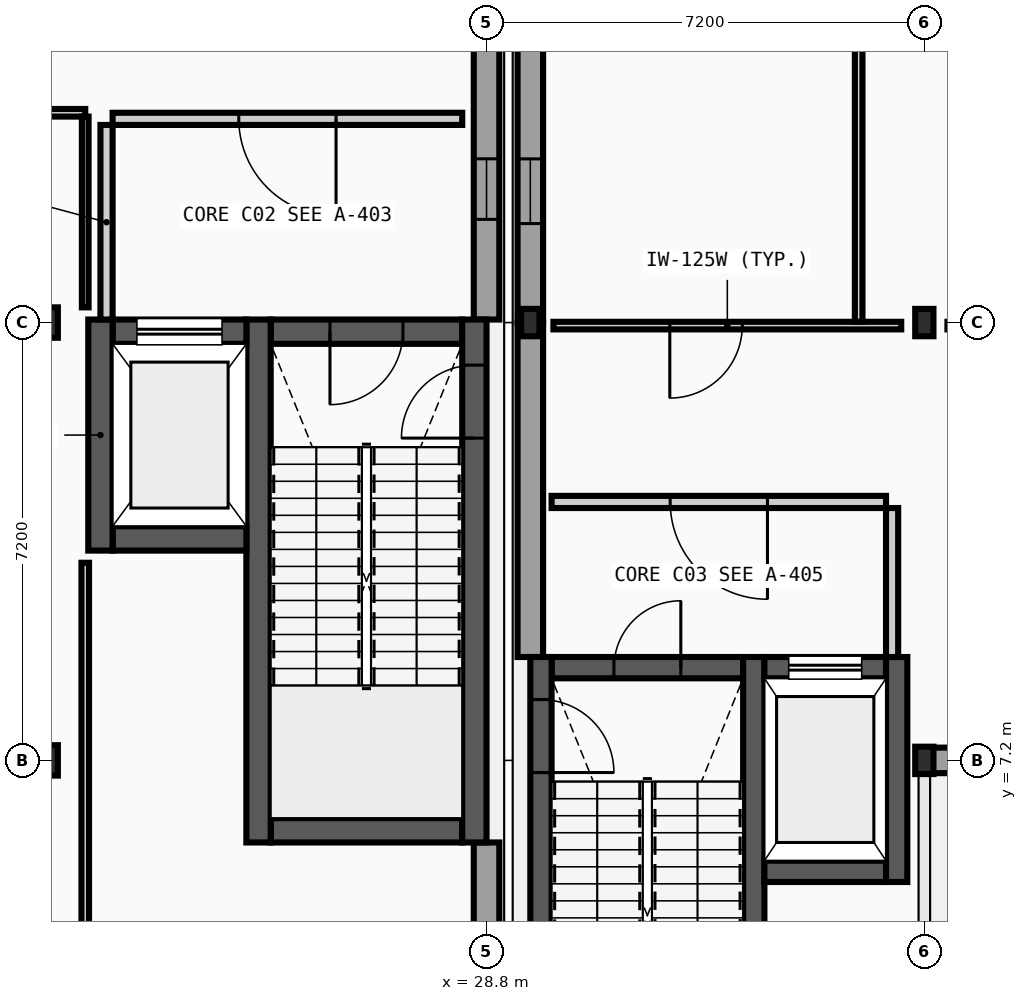
"""IFC4 building model, lengths in metres.
Left out: names, types, materials, properties, quantities, classifications, styles, units other than length and angle.
Written with IfcOpenShell. Run it as: python <this file> out.ifc"""

import sys

from ifc_helpers import new_model, si_unit, direction, frame, frame_2d, origin, origin_2d, place, context, subcontext, project, spatial, rectangle, i_section, extrude, element, fill, save


model = new_model("IFC4")
c1 = context("Model", 3, precision=1e-05, world=origin(), true_north=direction((0.0, 1.0)))
c2 = subcontext(c1, "Body", "Model", "MODEL_VIEW")
j1 = project(units=[si_unit("LENGTHUNIT", "METRE"), si_unit("PLANEANGLEUNIT", "RADIAN")], contexts=[c1])
p1 = place(None, origin())
s1 = spatial("IfcSite", under=j1, at=p1, CompositionType="ELEMENT")
p2 = place(p1, origin())
s2 = spatial("IfcBuilding", under=s1, at=p2, CompositionType="ELEMENT")
p3 = place(p2, origin())
s3 = spatial("IfcBuildingStorey", under=s2, at=p3, CompositionType="ELEMENT", Elevation=0.0)
for number, where, z_axis, x_axis in (
    (1, (21.6, 7.2, 0.0), (0.0, 0.0, 1.0), (1.0, 0.0, 0.0)),
    (2, (21.6, 14.4, 0.0), (0.0, 0.0, 1.0), (1.0, 0.0, 0.0)),
):
    element("IfcColumn", number, at=place(p3, frame(where, z_axis=z_axis, x_axis=x_axis)), inside=s3, PredefinedType="COLUMN", context=c2, shape_type="SweptSolid", body=[
        extrude(i_section(OverallWidth=0.3, OverallDepth=0.5, WebThickness=0.014, FlangeThickness=0.028, FilletRadius=0.027, at=origin_2d()), origin(), (0.0, 0.0, 1.0), 5.2),
    ])
for number, where, z_axis, x_axis in (
    (3, (29.52, 14.4, 0.0), (0.0, 0.0, 1.0), (1.0, 0.0, 0.0)),
    (4, (36.0, 7.2, 0.0), (0.0, 0.0, 1.0), (1.0, 0.0, 0.0)),
    (5, (36.0, 14.4, 0.0), (0.0, 0.0, 1.0), (1.0, 0.0, 0.0)),
):
    element("IfcColumn", number, at=place(p3, frame(where, z_axis=z_axis, x_axis=x_axis)), inside=s3, PredefinedType="COLUMN", context=c2, shape_type="SweptSolid", body=[
        extrude(i_section(OverallWidth=0.3, OverallDepth=0.45, WebThickness=0.014, FlangeThickness=0.026, FilletRadius=0.027, at=origin_2d()), origin(), (0.0, 0.0, 1.0), 5.2),
    ])
p4 = place(p3, frame((28.8, -0.21, 0.0), z_axis=(0.0, 0.0, 1.0), x_axis=(0.0, 1.0, 0.0)))
e6 = element("IfcWall", 6, at=p4, inside=s3, PredefinedType="STANDARD", context=c2, shape_type="SweptSolid", body=[
    extrude(rectangle(XDim=6.06, YDim=0.42, at=frame_2d((3.03, 0.0))), origin(), (0.0, 0.0, 1.0), 4.97),
])
p5 = place(p4, frame((2.549, 0.0, 0.95)))
e7 = element("IfcOpeningElement", 7, at=p5, cuts=e6, PredefinedType="OPENING", context=c2, shape_type="SweptSolid", body=[
    extrude(rectangle(XDim=0.962, YDim=1.26, at=frame_2d((0.481, 0.63))), frame((0.0, 0.22, 0.0), z_axis=(0.0, -1.0, 0.0), x_axis=(1.0, 0.0, 0.0)), (0.0, 0.0, 1.0), 0.44),
])
p6 = place(p3, frame((28.8, 14.45, 0.0), z_axis=(0.0, 0.0, 1.0), x_axis=(0.0, 1.0, 0.0)))
e8 = element("IfcWall", 8, at=p6, inside=s3, PredefinedType="STANDARD", context=c2, shape_type="SweptSolid", body=[
    extrude(rectangle(XDim=7.15, YDim=0.42, at=frame_2d((3.575, 0.0))), origin(), (0.0, 0.0, 1.0), 4.97),
])
p7 = place(p6, frame((1.647, 0.0, 0.95)))
e9 = element("IfcOpeningElement", 9, at=p7, cuts=e8, PredefinedType="OPENING", context=c2, shape_type="SweptSolid", body=[
    extrude(rectangle(XDim=0.996, YDim=1.26, at=frame_2d((0.498, 0.63))), frame((0.0, 0.22, 0.0), z_axis=(0.0, -1.0, 0.0), x_axis=(1.0, 0.0, 0.0)), (0.0, 0.0, 1.0), 0.44),
])
p8 = place(p6, frame((4.507, 0.0, 0.95)))
e10 = element("IfcOpeningElement", 10, at=p8, cuts=e8, PredefinedType="OPENING", context=c2, shape_type="SweptSolid", body=[
    extrude(rectangle(XDim=0.996, YDim=1.26, at=frame_2d((0.498, 0.63))), frame((0.0, 0.22, 0.0), z_axis=(0.0, -1.0, 0.0), x_axis=(1.0, 0.0, 0.0)), (0.0, 0.0, 1.0), 0.44),
])
p9 = place(p3, frame((36.07, 7.2, 0.0), z_axis=(0.0, 0.0, 1.0), x_axis=(1.0, 0.0, 0.0)))
e11 = element("IfcWall", 11, at=p9, inside=s3, PredefinedType="STANDARD", context=c2, shape_type="SweptSolid", body=[
    extrude(rectangle(XDim=6.984, YDim=0.42, at=frame_2d((3.492, 0.0))), origin(), (0.0, 0.0, 1.0), 4.665),
])
p10 = place(p9, frame((4.034, 0.0, 0.0)))
e12 = element("IfcOpeningElement", 12, at=p10, cuts=e11, PredefinedType="OPENING", context=c2, shape_type="SweptSolid", body=[
    extrude(rectangle(XDim=2.1, YDim=2.4, at=frame_2d((1.05, 1.2))), frame((0.0, 0.22, 0.0), z_axis=(0.0, -1.0, 0.0), x_axis=(1.0, 0.0, 0.0)), (0.0, 0.0, 1.0), 0.44),
])
p11 = place(p3, frame((29.52, 14.4, 0.0), z_axis=(0.0, 0.0, 1.0), x_axis=(0.0, -1.0, 0.0)))
e13 = element("IfcWall", 13, at=p11, inside=s3, PredefinedType="STANDARD", context=c2, shape_type="SweptSolid", body=[
    extrude(rectangle(XDim=5.5, YDim=0.42, at=frame_2d((2.75, 0.0))), origin(), (0.0, 0.0, 1.0), 4.97),
])
p12 = place(p3, frame((29.52, 21.6, 0.0), z_axis=(0.0, 0.0, 1.0), x_axis=(0.0, -1.0, 0.0)))
e14 = element("IfcWall", 14, at=p12, inside=s3, PredefinedType="STANDARD", context=c2, shape_type="SweptSolid", body=[
    extrude(rectangle(XDim=7.2, YDim=0.42, at=frame_2d((3.6, 0.0))), origin(), (0.0, 0.0, 1.0), 4.665),
])
p13 = place(p12, frame((1.628, 0.0, 0.95)))
e15 = element("IfcOpeningElement", 15, at=p13, cuts=e14, PredefinedType="OPENING", context=c2, shape_type="SweptSolid", body=[
    extrude(rectangle(XDim=1.064, YDim=1.296, at=frame_2d((0.532, 0.648))), frame((0.0, 0.22, 0.0), z_axis=(0.0, -1.0, 0.0), x_axis=(1.0, 0.0, 0.0)), (0.0, 0.0, 1.0), 0.44),
])
p14 = place(p12, frame((4.508, 0.0, 0.95)))
e16 = element("IfcOpeningElement", 16, at=p14, cuts=e14, PredefinedType="OPENING", context=c2, shape_type="SweptSolid", body=[
    extrude(rectangle(XDim=1.064, YDim=1.296, at=frame_2d((0.532, 0.648))), frame((0.0, 0.22, 0.0), z_axis=(0.0, -1.0, 0.0), x_axis=(1.0, 0.0, 0.0)), (0.0, 0.0, 1.0), 0.44),
])
p15 = place(p3, frame((25.25, 6.05, 0.0), z_axis=(0.0, 0.0, 1.0), x_axis=(1.0, 0.0, 0.0)))
e17 = element("IfcWall", 17, at=p15, inside=s3, PredefinedType="SHEAR", context=c2, shape_type="SweptSolid", body=[
    extrude(rectangle(XDim=3.15, YDim=0.4, at=frame_2d((1.575, 0.0))), origin(), (0.0, 0.0, 1.0), 4.97),
])
p16 = place(p3, frame((25.25, 14.25, 0.0), z_axis=(0.0, 0.0, 1.0), x_axis=(1.0, 0.0, 0.0)))
e18 = element("IfcWall", 18, at=p16, inside=s3, PredefinedType="SHEAR", context=c2, shape_type="SweptSolid", body=[
    extrude(rectangle(XDim=3.15, YDim=0.4, at=frame_2d((1.575, 0.0))), origin(), (0.0, 0.0, 1.0), 4.97),
])
p17 = place(p16, frame((0.975, 0.0, 0.0)))
e19 = element("IfcOpeningElement", 19, at=p17, cuts=e18, PredefinedType="OPENING", context=c2, shape_type="SweptSolid", body=[
    extrude(rectangle(XDim=1.2, YDim=2.15, at=frame_2d((0.6, 1.075))), frame((0.0, 0.21, 0.0), z_axis=(0.0, -1.0, 0.0), x_axis=(1.0, 0.0, 0.0)), (0.0, 0.0, 1.0), 0.42),
])
p18 = place(p3, frame((25.05, 5.85, 0.0), z_axis=(0.0, 0.0, 1.0), x_axis=(0.0, 1.0, 0.0)))
e20 = element("IfcWall", 20, at=p18, inside=s3, PredefinedType="SHEAR", context=c2, shape_type="SweptSolid", body=[
    extrude(rectangle(XDim=8.6, YDim=0.4, at=frame_2d((4.3, 0.0))), origin(), (0.0, 0.0, 1.0), 4.97),
])
p19 = place(p3, frame((28.6, 5.85, 0.0), z_axis=(0.0, 0.0, 1.0), x_axis=(0.0, 1.0, 0.0)))
e21 = element("IfcWall", 21, at=p19, inside=s3, PredefinedType="SHEAR", context=c2, shape_type="SweptSolid", body=[
    extrude(rectangle(XDim=8.6, YDim=0.4, at=frame_2d((4.3, 0.0))), origin(), (0.0, 0.0, 1.0), 4.97),
])
p20 = place(p19, frame((6.65, 0.0, 0.0)))
e22 = element("IfcOpeningElement", 22, at=p20, cuts=e21, PredefinedType="OPENING", context=c2, shape_type="SweptSolid", body=[
    extrude(rectangle(XDim=1.2, YDim=2.15, at=frame_2d((0.6, 1.075))), frame((0.0, 0.21, 0.0), z_axis=(0.0, -1.0, 0.0), x_axis=(1.0, 0.0, 0.0)), (0.0, 0.0, 1.0), 0.42),
])
p21 = place(p3, frame((22.65, 10.85, 0.0), z_axis=(0.0, 0.0, 1.0), x_axis=(1.0, 0.0, 0.0)))
e23 = element("IfcWall", 23, at=p21, inside=s3, PredefinedType="SHEAR", context=c2, shape_type="SweptSolid", body=[
    extrude(rectangle(XDim=2.2, YDim=0.4, at=frame_2d((1.1, 0.0))), origin(), (0.0, 0.0, 1.0), 4.97),
])
p22 = place(p3, frame((22.65, 14.25, 0.0), z_axis=(0.0, 0.0, 1.0), x_axis=(1.0, 0.0, 0.0)))
e24 = element("IfcWall", 24, at=p22, inside=s3, PredefinedType="SHEAR", context=c2, shape_type="SweptSolid", body=[
    extrude(rectangle(XDim=2.2, YDim=0.4, at=frame_2d((1.1, 0.0))), origin(), (0.0, 0.0, 1.0), 4.97),
])
p23 = place(p22, frame((0.4, 0.0, 0.0)))
e25 = element("IfcOpeningElement", 25, at=p23, cuts=e24, PredefinedType="OPENING", context=c2, shape_type="SweptSolid", body=[
    extrude(rectangle(XDim=1.4, YDim=2.2, at=frame_2d((0.7, 1.1))), frame((0.0, 0.21, 0.0), z_axis=(0.0, -1.0, 0.0), x_axis=(1.0, 0.0, 0.0)), (0.0, 0.0, 1.0), 0.42),
])
p24 = place(p3, frame((22.45, 10.65, 0.0), z_axis=(0.0, 0.0, 1.0), x_axis=(0.0, 1.0, 0.0)))
e26 = element("IfcWall", 26, at=p24, inside=s3, PredefinedType="SHEAR", context=c2, shape_type="SweptSolid", body=[
    extrude(rectangle(XDim=3.8, YDim=0.4, at=frame_2d((1.9, 0.0))), origin(), (0.0, 0.0, 1.0), 4.97),
])
p25 = place(p3, frame((22.65, 17.75, 0.0), z_axis=(0.0, 0.0, 1.0), x_axis=(1.0, 0.0, 0.0)))
e27 = element("IfcWall", 27, at=p25, inside=s3, PredefinedType="PARTITIONING", context=c2, shape_type="SweptSolid", body=[
    extrude(rectangle(XDim=5.75, YDim=0.2, at=frame_2d((2.875, 0.0))), origin(), (0.0, 0.0, 1.0), 4.97),
])
p26 = place(p25, frame((2.075, 0.0, 0.0)))
e28 = element("IfcOpeningElement", 28, at=p26, cuts=e27, PredefinedType="OPENING", context=c2, shape_type="SweptSolid", body=[
    extrude(rectangle(XDim=1.6, YDim=2.2, at=frame_2d((0.8, 1.1))), frame((0.0, 0.11, 0.0), z_axis=(0.0, -1.0, 0.0), x_axis=(1.0, 0.0, 0.0)), (0.0, 0.0, 1.0), 0.22),
])
p27 = place(p3, frame((22.55, 14.45, 0.0), z_axis=(0.0, 0.0, 1.0), x_axis=(0.0, 1.0, 0.0)))
e29 = element("IfcWall", 29, at=p27, inside=s3, PredefinedType="PARTITIONING", context=c2, shape_type="SweptSolid", body=[
    extrude(rectangle(XDim=3.2, YDim=0.2, at=frame_2d((1.6, 0.0))), origin(), (0.0, 0.0, 1.0), 4.97),
])
p28 = place(p3, frame((29.87, 8.725, 0.0), z_axis=(0.0, 0.0, 1.0), x_axis=(1.0, 0.0, 0.0)))
e30 = element("IfcWall", 30, at=p28, inside=s3, PredefinedType="SHEAR", context=c2, shape_type="SweptSolid", body=[
    extrude(rectangle(XDim=3.15, YDim=0.35, at=frame_2d((1.575, 0.0))), origin(), (0.0, 0.0, 1.0), 4.97),
])
p29 = place(p28, frame((1.025, 0.0, 0.0)))
e31 = element("IfcOpeningElement", 31, at=p29, cuts=e30, PredefinedType="OPENING", context=c2, shape_type="SweptSolid", body=[
    extrude(rectangle(XDim=1.1, YDim=2.15, at=frame_2d((0.55, 1.075))), frame((0.0, 0.185, 0.0), z_axis=(0.0, -1.0, 0.0), x_axis=(1.0, 0.0, 0.0)), (0.0, 0.0, 1.0), 0.37),
])
p30 = place(p3, frame((29.695, 0.4, 0.0), z_axis=(0.0, 0.0, 1.0), x_axis=(0.0, 1.0, 0.0)))
e32 = element("IfcWall", 32, at=p30, inside=s3, PredefinedType="SHEAR", context=c2, shape_type="SweptSolid", body=[
    extrude(rectangle(XDim=8.5, YDim=0.35, at=frame_2d((4.25, 0.0))), origin(), (0.0, 0.0, 1.0), 4.97),
])
p31 = place(p30, frame((6.6, 0.0, 0.0)))
e33 = element("IfcOpeningElement", 33, at=p31, cuts=e32, PredefinedType="OPENING", context=c2, shape_type="SweptSolid", body=[
    extrude(rectangle(XDim=1.2, YDim=2.15, at=frame_2d((0.6, 1.075))), frame((0.0, 0.185, 0.0), z_axis=(0.0, -1.0, 0.0), x_axis=(1.0, 0.0, 0.0)), (0.0, 0.0, 1.0), 0.37),
])
p32 = place(p3, frame((33.195, 0.4, 0.0), z_axis=(0.0, 0.0, 1.0), x_axis=(0.0, 1.0, 0.0)))
e34 = element("IfcWall", 34, at=p32, inside=s3, PredefinedType="SHEAR", context=c2, shape_type="SweptSolid", body=[
    extrude(rectangle(XDim=8.5, YDim=0.35, at=frame_2d((4.25, 0.0))), origin(), (0.0, 0.0, 1.0), 4.97),
])
p33 = place(p3, frame((33.37, 5.375, 0.0), z_axis=(0.0, 0.0, 1.0), x_axis=(1.0, 0.0, 0.0)))
e35 = element("IfcWall", 35, at=p33, inside=s3, PredefinedType="SHEAR", context=c2, shape_type="SweptSolid", body=[
    extrude(rectangle(XDim=2.0, YDim=0.35, at=frame_2d((1.0, 0.0))), origin(), (0.0, 0.0, 1.0), 4.97),
])
p34 = place(p3, frame((33.37, 8.725, 0.0), z_axis=(0.0, 0.0, 1.0), x_axis=(1.0, 0.0, 0.0)))
e36 = element("IfcWall", 36, at=p34, inside=s3, PredefinedType="SHEAR", context=c2, shape_type="SweptSolid", body=[
    extrude(rectangle(XDim=2.0, YDim=0.35, at=frame_2d((1.0, 0.0))), origin(), (0.0, 0.0, 1.0), 4.97),
])
p35 = place(p34, frame((0.4, 0.0, 0.0)))
e37 = element("IfcOpeningElement", 37, at=p35, cuts=e36, PredefinedType="OPENING", context=c2, shape_type="SweptSolid", body=[
    extrude(rectangle(XDim=1.2, YDim=2.2, at=frame_2d((0.6, 1.1))), frame((0.0, 0.185, 0.0), z_axis=(0.0, -1.0, 0.0), x_axis=(1.0, 0.0, 0.0)), (0.0, 0.0, 1.0), 0.37),
])
p36 = place(p3, frame((35.545, 5.2, 0.0), z_axis=(0.0, 0.0, 1.0), x_axis=(0.0, 1.0, 0.0)))
e38 = element("IfcWall", 38, at=p36, inside=s3, PredefinedType="SHEAR", context=c2, shape_type="SweptSolid", body=[
    extrude(rectangle(XDim=3.7, YDim=0.35, at=frame_2d((1.85, 0.0))), origin(), (0.0, 0.0, 1.0), 4.97),
])
p37 = place(p3, frame((29.87, 11.45, 0.0), z_axis=(0.0, 0.0, 1.0), x_axis=(1.0, 0.0, 0.0)))
e39 = element("IfcWall", 39, at=p37, inside=s3, PredefinedType="PARTITIONING", context=c2, shape_type="SweptSolid", body=[
    extrude(rectangle(XDim=5.5, YDim=0.2, at=frame_2d((2.75, 0.0))), origin(), (0.0, 0.0, 1.0), 4.97),
])
p38 = place(p37, frame((1.95, 0.0, 0.0)))
e40 = element("IfcOpeningElement", 40, at=p38, cuts=e39, PredefinedType="OPENING", context=c2, shape_type="SweptSolid", body=[
    extrude(rectangle(XDim=1.6, YDim=2.2, at=frame_2d((0.8, 1.1))), frame((0.0, 0.11, 0.0), z_axis=(0.0, -1.0, 0.0), x_axis=(1.0, 0.0, 0.0)), (0.0, 0.0, 1.0), 0.22),
])
p39 = place(p3, frame((35.47, 8.9, 0.0), z_axis=(0.0, 0.0, 1.0), x_axis=(0.0, 1.0, 0.0)))
e41 = element("IfcWall", 41, at=p39, inside=s3, PredefinedType="PARTITIONING", context=c2, shape_type="SweptSolid", body=[
    extrude(rectangle(XDim=2.45, YDim=0.2, at=frame_2d((1.225, 0.0))), origin(), (0.0, 0.0, 1.0), 4.97),
])
p40 = place(p3, frame((29.9, 14.35, 0.0), z_axis=(0.0, 0.0, 1.0), x_axis=(1.0, 0.0, 0.0)))
e42 = element("IfcWall", 42, at=p40, inside=s3, PredefinedType="PARTITIONING", context=c2, shape_type="SweptSolid", body=[
    extrude(rectangle(XDim=5.72, YDim=0.125, at=frame_2d((2.86, 0.0))), origin(), (0.0, 0.0, 1.0), 4.665),
])
p41 = place(p40, frame((1.914, 0.0, 0.0)))
e43 = element("IfcOpeningElement", 43, at=p41, cuts=e42, PredefinedType="OPENING", context=c2, shape_type="SweptSolid", body=[
    extrude(rectangle(XDim=1.192, YDim=2.068, at=frame_2d((0.596, 1.034))), frame((0.0, 0.073, 0.0), z_axis=(0.0, -1.0, 0.0), x_axis=(1.0, 0.0, 0.0)), (0.0, 0.0, 1.0), 0.145),
])
p42 = place(p3, frame((9.45, 17.85, 0.0), z_axis=(0.0, 0.0, 1.0), x_axis=(1.0, 0.0, 0.0)))
e44 = element("IfcWall", 44, at=p42, inside=s3, PredefinedType="PARTITIONING", context=c2, shape_type="SweptSolid", body=[
    extrude(rectangle(XDim=12.75, YDim=0.125, at=frame_2d((6.375, 0.0))), origin(), (0.0, 0.0, 1.0), 4.97),
])
p43 = place(p42, frame((7.85, 0.0, 0.0)))
e45 = element("IfcOpeningElement", 45, at=p43, cuts=e44, PredefinedType="OPENING", context=c2, shape_type="SweptSolid", body=[
    extrude(rectangle(XDim=1.0, YDim=2.1, at=frame_2d((0.5, 1.05))), frame((0.0, 0.073, 0.0), z_axis=(0.0, -1.0, 0.0), x_axis=(1.0, 0.0, 0.0)), (0.0, 0.0, 1.0), 0.145),
])
p44 = place(p42, frame((0.45, 0.0, 0.0)))
e46 = element("IfcOpeningElement", 46, at=p44, cuts=e44, PredefinedType="OPENING", context=c2, shape_type="SweptSolid", body=[
    extrude(rectangle(XDim=1.062, YDim=2.068, at=frame_2d((0.531, 1.034))), frame((0.0, 0.073, 0.0), z_axis=(0.0, -1.0, 0.0), x_axis=(1.0, 0.0, 0.0)), (0.0, 0.0, 1.0), 0.145),
])
p45 = place(p3, frame((22.2, 0.2, 0.0), z_axis=(0.0, 0.0, 1.0), x_axis=(0.0, 1.0, 0.0)))
e47 = element("IfcWall", 47, at=p45, inside=s3, PredefinedType="PARTITIONING", context=c2, shape_type="SweptSolid", body=[
    extrude(rectangle(XDim=10.25, YDim=0.125, at=frame_2d((5.125, 0.0))), origin(), (0.0, 0.0, 1.0), 4.97),
])
p46 = place(p3, frame((22.2, 14.65, 0.0), z_axis=(0.0, 0.0, 1.0), x_axis=(0.0, 1.0, 0.0)))
e48 = element("IfcWall", 48, at=p46, inside=s3, PredefinedType="PARTITIONING", context=c2, shape_type="SweptSolid", body=[
    extrude(rectangle(XDim=3.138, YDim=0.11, at=frame_2d((1.569, 0.0))), origin(), (0.0, 0.0, 1.0), 4.97),
])
p47 = place(p3, frame((34.92, 14.413, 0.0), z_axis=(0.0, 0.0, 1.0), x_axis=(0.0, 1.0, 0.0)))
e49 = element("IfcWall", 49, at=p47, inside=s3, PredefinedType="PARTITIONING", context=c2, shape_type="SweptSolid", body=[
    extrude(rectangle(XDim=14.188, YDim=0.125, at=frame_2d((7.094, 0.0))), origin(), (0.0, 0.0, 1.0), 4.97),
])
p48 = place(p7, origin())
e50 = element("IfcWindow", 50, at=p48, inside=s3, PartitioningType="SINGLE_PANEL", PredefinedType="WINDOW", context=c2, shape_type="SweptSolid", body=[
    extrude(rectangle(XDim=0.996, YDim=1.26, at=frame_2d((0.498, 0.63))), frame((0.0, 0.03, 0.0), z_axis=(0.0, -1.0, 0.0), x_axis=(1.0, 0.0, 0.0)), (0.0, 0.0, 1.0), 0.06),
])
fill(e9, e50)
p49 = place(p14, origin())
e51 = element("IfcWindow", 51, at=p49, inside=s3, PartitioningType="SINGLE_PANEL", PredefinedType="WINDOW", context=c2, shape_type="SweptSolid", body=[
    extrude(rectangle(XDim=1.064, YDim=1.296, at=frame_2d((0.532, 0.648))), frame((0.0, 0.03, 0.0), z_axis=(0.0, -1.0, 0.0), x_axis=(1.0, 0.0, 0.0)), (0.0, 0.0, 1.0), 0.06),
])
fill(e16, e51)
p50 = place(p17, frame((1.2, 0.0, 0.0), z_axis=(0.0, 0.0, 1.0), x_axis=(-1.0, 0.0, 0.0)))
e52 = element("IfcDoor", 52, at=p50, inside=s3, OperationType="SINGLE_SWING_LEFT", PredefinedType="DOOR", context=c2, shape_type="SweptSolid", body=[
    extrude(rectangle(XDim=1.2, YDim=2.15, at=frame_2d((0.6, 1.075))), frame((0.0, 0.025, 0.0), z_axis=(0.0, -1.0, 0.0), x_axis=(1.0, 0.0, 0.0)), (0.0, 0.0, 1.0), 0.05),
])
fill(e19, e52)
p51 = place(p20, origin())
e53 = element("IfcDoor", 53, at=p51, inside=s3, OperationType="SINGLE_SWING_LEFT", PredefinedType="DOOR", context=c2, shape_type="SweptSolid", body=[
    extrude(rectangle(XDim=1.2, YDim=2.15, at=frame_2d((0.6, 1.075))), frame((0.0, 0.025, 0.0), z_axis=(0.0, -1.0, 0.0), x_axis=(1.0, 0.0, 0.0)), (0.0, 0.0, 1.0), 0.05),
])
fill(e22, e53)
p52 = place(p23, origin())
e54 = element("IfcDoor", 54, at=p52, inside=s3, OperationType="SLIDING_TO_LEFT", PredefinedType="DOOR", context=c2, shape_type="SweptSolid", body=[
    extrude(rectangle(XDim=1.4, YDim=2.2, at=frame_2d((0.7, 1.1))), frame((0.0, 0.025, 0.0), z_axis=(0.0, -1.0, 0.0), x_axis=(1.0, 0.0, 0.0)), (0.0, 0.0, 1.0), 0.05),
])
fill(e25, e54)
p53 = place(p26, origin())
e55 = element("IfcDoor", 55, at=p53, inside=s3, OperationType="DOUBLE_DOOR_SINGLE_SWING", PredefinedType="DOOR", context=c2, shape_type="SweptSolid", body=[
    extrude(rectangle(XDim=1.6, YDim=2.2, at=frame_2d((0.8, 1.1))), frame((0.0, 0.025, 0.0), z_axis=(0.0, -1.0, 0.0), x_axis=(1.0, 0.0, 0.0)), (0.0, 0.0, 1.0), 0.05),
])
fill(e28, e55)
p54 = place(p29, frame((1.1, 0.0, 0.0), z_axis=(0.0, 0.0, 1.0), x_axis=(-1.0, 0.0, 0.0)))
e56 = element("IfcDoor", 56, at=p54, inside=s3, OperationType="SINGLE_SWING_RIGHT", PredefinedType="DOOR", context=c2, shape_type="SweptSolid", body=[
    extrude(rectangle(XDim=1.1, YDim=2.15, at=frame_2d((0.55, 1.075))), frame((0.0, 0.025, 0.0), z_axis=(0.0, -1.0, 0.0), x_axis=(1.0, 0.0, 0.0)), (0.0, 0.0, 1.0), 0.05),
])
fill(e31, e56)
p55 = place(p31, frame((1.2, 0.0, 0.0), z_axis=(0.0, 0.0, 1.0), x_axis=(-1.0, 0.0, 0.0)))
e57 = element("IfcDoor", 57, at=p55, inside=s3, OperationType="SINGLE_SWING_LEFT", PredefinedType="DOOR", context=c2, shape_type="SweptSolid", body=[
    extrude(rectangle(XDim=1.2, YDim=2.15, at=frame_2d((0.6, 1.075))), frame((0.0, 0.025, 0.0), z_axis=(0.0, -1.0, 0.0), x_axis=(1.0, 0.0, 0.0)), (0.0, 0.0, 1.0), 0.05),
])
fill(e33, e57)
p56 = place(p35, origin())
e58 = element("IfcDoor", 58, at=p56, inside=s3, OperationType="SLIDING_TO_RIGHT", PredefinedType="DOOR", context=c2, shape_type="SweptSolid", body=[
    extrude(rectangle(XDim=1.2, YDim=2.2, at=frame_2d((0.6, 1.1))), frame((0.0, 0.025, 0.0), z_axis=(0.0, -1.0, 0.0), x_axis=(1.0, 0.0, 0.0)), (0.0, 0.0, 1.0), 0.05),
])
fill(e37, e58)
p57 = place(p38, origin())
e59 = element("IfcDoor", 59, at=p57, inside=s3, OperationType="DOUBLE_DOOR_SINGLE_SWING", PredefinedType="DOOR", context=c2, shape_type="SweptSolid", body=[
    extrude(rectangle(XDim=1.6, YDim=2.2, at=frame_2d((0.8, 1.1))), frame((0.0, 0.025, 0.0), z_axis=(0.0, -1.0, 0.0), x_axis=(1.0, 0.0, 0.0)), (0.0, 0.0, 1.0), 0.05),
])
fill(e40, e59)
p58 = place(p41, frame((1.192, 0.0, 0.0), z_axis=(0.0, 0.0, 1.0), x_axis=(-1.0, 0.0, 0.0)))
e60 = element("IfcDoor", 60, at=p58, inside=s3, OperationType="SINGLE_SWING_LEFT", PredefinedType="DOOR", context=c2, shape_type="SweptSolid", body=[
    extrude(rectangle(XDim=1.192, YDim=2.068, at=frame_2d((0.596, 1.034))), frame((0.0, 0.025, 0.0), z_axis=(0.0, -1.0, 0.0), x_axis=(1.0, 0.0, 0.0)), (0.0, 0.0, 1.0), 0.05),
])
fill(e43, e60)
save(model, sys.argv[1])
